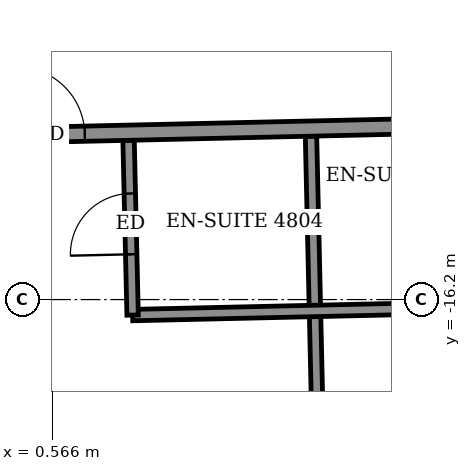
"""IFC4 building model, lengths in metres.
Left out: names, types, materials, properties, quantities, classifications, styles, units other than length and angle.
Written with IfcOpenShell. Run it as: python <this file> out.ifc"""

import sys

from ifc_helpers import new_model, si_unit, direction, frame, frame_2d, origin, place, context, subcontext, project, spatial, rectangle, extrude, element, fill, save


model = new_model("IFC4")
c1 = context("Model", 3, precision=1e-05, world=origin(), true_north=direction((0.0, 1.0)))
c2 = subcontext(c1, "Body", "Model", "MODEL_VIEW")
j1 = project(units=[si_unit("LENGTHUNIT", "METRE"), si_unit("PLANEANGLEUNIT", "RADIAN")], contexts=[c1])
p1 = place(None, origin())
s1 = spatial("IfcSite", under=j1, at=p1, CompositionType="ELEMENT")
p2 = place(p1, origin())
s2 = spatial("IfcBuilding", under=s1, at=p2, CompositionType="ELEMENT")
p3 = place(p2, frame((0.0, 0.0, 189.7)))
s3 = spatial("IfcBuildingStorey", under=s2, at=p3, CompositionType="ELEMENT", Elevation=189.7)
p4 = place(p3, frame((4.102, -19.999, 0.0), z_axis=(0.0, 0.0, 1.0), x_axis=(-0.022688785847, 0.999742576365, 0.0)))
e1 = element("IfcWall", 1, at=p4, inside=s3, PredefinedType="PARTITIONING", context=c2, shape_type="SweptSolid", body=[
    extrude(rectangle(XDim=5.95, YDim=0.15, at=frame_2d((2.975, 0.0))), origin(), (0.0, 0.0, 1.0), 2.55),
])
p5 = place(p3, frame((1.62, -16.404, 0.0), z_axis=(0.0, 0.0, 1.0), x_axis=(0.999741415159, 0.022739894798, 0.0)))
e2 = element("IfcWall", 2, at=p5, inside=s3, PredefinedType="PARTITIONING", context=c2, shape_type="SweptSolid", body=[
    extrude(rectangle(XDim=4.799, YDim=0.15, at=frame_2d((2.399, 0.0))), origin(), (0.0, 0.0, 1.0), 3.05),
])
p6 = place(p3, frame((1.62, -16.404, 0.0), z_axis=(0.0, 0.0, 1.0), x_axis=(-0.023143422514, 0.999732155127, 0.0)))
e3 = element("IfcWall", 3, at=p6, inside=s3, PredefinedType="PARTITIONING", context=c2, shape_type="SweptSolid", body=[
    extrude(rectangle(XDim=2.3, YDim=0.15, at=frame_2d((1.15, 0.0))), origin(), (0.0, 0.0, 1.0), 3.05),
])
p7 = place(p6, frame((0.8, 0.0, 0.0)))
e4 = element("IfcOpeningElement", 4, at=p7, cuts=e3, PredefinedType="OPENING", context=c2, shape_type="SweptSolid", body=[
    extrude(rectangle(XDim=0.8, YDim=2.1, at=frame_2d((0.4, 1.05))), frame((0.0, 0.085, 0.0), z_axis=(0.0, -1.0, 0.0), x_axis=(1.0, 0.0, 0.0)), (0.0, 0.0, 1.0), 0.17),
])
p8 = place(p3, frame((-21.279, -14.523, 0.0), z_axis=(0.0, 0.0, 1.0), x_axis=(0.999742878501, 0.022675468818, 0.0)))
e5 = element("IfcWall", 5, at=p8, inside=s3, PredefinedType="PARTITIONING", context=c2, shape_type="SweptSolid", body=[
    extrude(rectangle(XDim=46.48, YDim=0.2, at=frame_2d((23.24, 0.0))), origin(), (0.0, 0.0, 1.0), 3.05),
])
p9 = place(p8, frame((1.4, 0.0, 0.0)))
e6 = element("IfcOpeningElement", 6, at=p9, cuts=e5, PredefinedType="OPENING", context=c2, shape_type="SweptSolid", body=[
    extrude(rectangle(XDim=1.0, YDim=2.1, at=frame_2d((0.5, 1.05))), frame((0.0, 0.11, 0.0), z_axis=(0.0, -1.0, 0.0), x_axis=(1.0, 0.0, 0.0)), (0.0, 0.0, 1.0), 0.22),
])
p10 = place(p8, frame((5.95, 0.0, 0.0)))
e7 = element("IfcOpeningElement", 7, at=p10, cuts=e5, PredefinedType="OPENING", context=c2, shape_type="SweptSolid", body=[
    extrude(rectangle(XDim=0.9, YDim=2.1, at=frame_2d((0.45, 1.05))), frame((0.0, 0.11, 0.0), z_axis=(0.0, -1.0, 0.0), x_axis=(1.0, 0.0, 0.0)), (0.0, 0.0, 1.0), 0.22),
])
p11 = place(p8, frame((10.575, 0.0, 0.0)))
e8 = element("IfcOpeningElement", 8, at=p11, cuts=e5, PredefinedType="OPENING", context=c2, shape_type="SweptSolid", body=[
    extrude(rectangle(XDim=0.9, YDim=2.1, at=frame_2d((0.45, 1.05))), frame((0.0, 0.11, 0.0), z_axis=(0.0, -1.0, 0.0), x_axis=(1.0, 0.0, 0.0)), (0.0, 0.0, 1.0), 0.22),
])
p12 = place(p8, frame((12.625, 0.0, 0.0)))
e9 = element("IfcOpeningElement", 9, at=p12, cuts=e5, PredefinedType="OPENING", context=c2, shape_type="SweptSolid", body=[
    extrude(rectangle(XDim=0.9, YDim=2.1, at=frame_2d((0.45, 1.05))), frame((0.0, 0.11, 0.0), z_axis=(0.0, -1.0, 0.0), x_axis=(1.0, 0.0, 0.0)), (0.0, 0.0, 1.0), 0.22),
])
p13 = place(p8, frame((19.4, 0.0, 0.0)))
e10 = element("IfcOpeningElement", 10, at=p13, cuts=e5, PredefinedType="OPENING", context=c2, shape_type="SweptSolid", body=[
    extrude(rectangle(XDim=0.9, YDim=2.1, at=frame_2d((0.45, 1.05))), frame((0.0, 0.11, 0.0), z_axis=(0.0, -1.0, 0.0), x_axis=(1.0, 0.0, 0.0)), (0.0, 0.0, 1.0), 0.22),
])
p14 = place(p8, frame((21.375, 0.0, 0.0)))
e11 = element("IfcOpeningElement", 11, at=p14, cuts=e5, PredefinedType="OPENING", context=c2, shape_type="SweptSolid", body=[
    extrude(rectangle(XDim=0.9, YDim=2.1, at=frame_2d((0.45, 1.05))), frame((0.0, 0.11, 0.0), z_axis=(0.0, -1.0, 0.0), x_axis=(1.0, 0.0, 0.0)), (0.0, 0.0, 1.0), 0.22),
])
p15 = place(p8, frame((28.15, 0.0, 0.0)))
e12 = element("IfcOpeningElement", 12, at=p15, cuts=e5, PredefinedType="OPENING", context=c2, shape_type="SweptSolid", body=[
    extrude(rectangle(XDim=0.9, YDim=2.1, at=frame_2d((0.45, 1.05))), frame((0.0, 0.11, 0.0), z_axis=(0.0, -1.0, 0.0), x_axis=(1.0, 0.0, 0.0)), (0.0, 0.0, 1.0), 0.22),
])
p16 = place(p8, frame((30.1, 0.0, 0.0)))
e13 = element("IfcOpeningElement", 13, at=p16, cuts=e5, PredefinedType="OPENING", context=c2, shape_type="SweptSolid", body=[
    extrude(rectangle(XDim=0.9, YDim=2.1, at=frame_2d((0.45, 1.05))), frame((0.0, 0.11, 0.0), z_axis=(0.0, -1.0, 0.0), x_axis=(1.0, 0.0, 0.0)), (0.0, 0.0, 1.0), 0.22),
])
p17 = place(p8, frame((36.875, 0.0, 0.0)))
e14 = element("IfcOpeningElement", 14, at=p17, cuts=e5, PredefinedType="OPENING", context=c2, shape_type="SweptSolid", body=[
    extrude(rectangle(XDim=0.9, YDim=2.1, at=frame_2d((0.45, 1.05))), frame((0.0, 0.11, 0.0), z_axis=(0.0, -1.0, 0.0), x_axis=(1.0, 0.0, 0.0)), (0.0, 0.0, 1.0), 0.22),
])
p18 = place(p8, frame((43.89, 0.0, 0.0)))
e15 = element("IfcOpeningElement", 15, at=p18, cuts=e5, PredefinedType="OPENING", context=c2, shape_type="SweptSolid", body=[
    extrude(rectangle(XDim=1.0, YDim=2.1, at=frame_2d((0.5, 1.05))), frame((0.0, 0.11, 0.0), z_axis=(0.0, -1.0, 0.0), x_axis=(1.0, 0.0, 0.0)), (0.0, 0.0, 1.0), 0.22),
])
p19 = place(p8, frame((39.05, 0.0, 0.0)))
e16 = element("IfcOpeningElement", 16, at=p19, cuts=e5, PredefinedType="OPENING", context=c2, shape_type="SweptSolid", body=[
    extrude(rectangle(XDim=0.9, YDim=2.1, at=frame_2d((0.45, 1.05))), frame((0.0, 0.11, 0.0), z_axis=(0.0, -1.0, 0.0), x_axis=(1.0, 0.0, 0.0)), (0.0, 0.0, 1.0), 0.22),
])
p20 = place(p14, origin())
e17 = element("IfcDoor", 17, at=p20, inside=s3, OperationType="SINGLE_SWING_RIGHT", PredefinedType="DOOR", context=c2, shape_type="SweptSolid", body=[
    extrude(rectangle(XDim=0.9, YDim=2.1, at=frame_2d((0.45, 1.05))), frame((0.0, 0.025, 0.0), z_axis=(0.0, -1.0, 0.0), x_axis=(1.0, 0.0, 0.0)), (0.0, 0.0, 1.0), 0.05),
])
fill(e11, e17)
p21 = place(p7, origin())
e18 = element("IfcDoor", 18, at=p21, inside=s3, OperationType="SINGLE_SWING_RIGHT", PredefinedType="DOOR", context=c2, shape_type="SweptSolid", body=[
    extrude(rectangle(XDim=0.8, YDim=2.1, at=frame_2d((0.4, 1.05))), frame((0.0, 0.025, 0.0), z_axis=(0.0, -1.0, 0.0), x_axis=(1.0, 0.0, 0.0)), (0.0, 0.0, 1.0), 0.05),
])
fill(e4, e18)
save(model, sys.argv[1])
